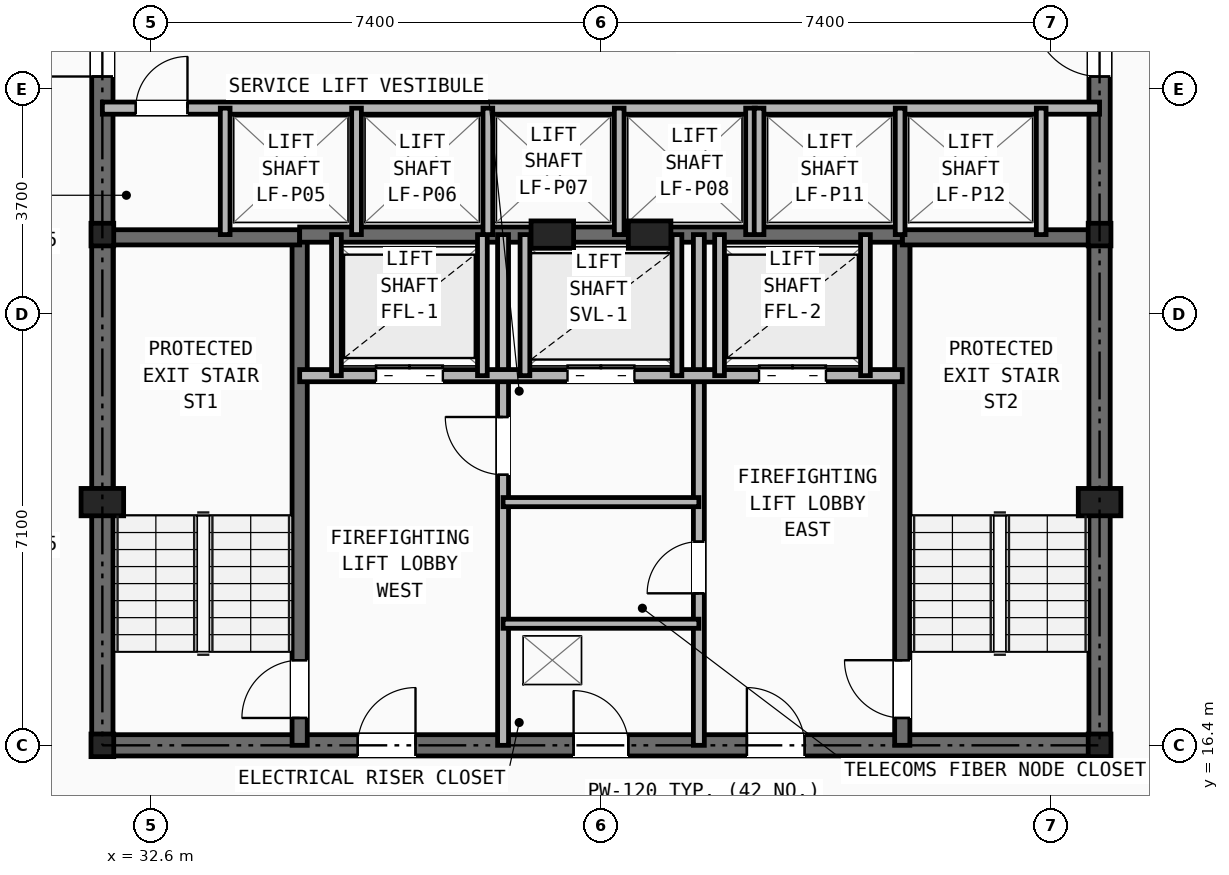
"""IFC4 building model, lengths in metres.
Left out: names, types, materials, properties, quantities, classifications, styles, units other than length and angle.
Written with IfcOpenShell. Run it as: python <this file> out.ifc"""

import sys

from ifc_helpers import new_model, si_unit, direction, frame, frame_2d, origin, origin_2d, place, context, subcontext, project, spatial, rectangle, i_section, extrude, element, fill, save


model = new_model("IFC4")
c1 = context("Model", 3, precision=1e-05, world=origin(), true_north=direction((0.0, 1.0)))
c2 = subcontext(c1, "Body", "Model", "MODEL_VIEW")
j1 = project(units=[si_unit("LENGTHUNIT", "METRE"), si_unit("PLANEANGLEUNIT", "RADIAN")], contexts=[c1])
p1 = place(None, origin())
s1 = spatial("IfcSite", under=j1, at=p1, CompositionType="ELEMENT")
p2 = place(p1, origin())
s2 = spatial("IfcBuilding", under=s1, at=p2, CompositionType="ELEMENT")
p3 = place(p2, frame((0.0, 0.0, 49.6)))
s3 = spatial("IfcBuildingStorey", under=s2, at=p3, CompositionType="ELEMENT", Elevation=49.6)
for number, where, z_axis, x_axis in (
    (1, (31.8, 16.4, 0.0), (0.0, 0.0, 1.0), (1.0, 0.0, 0.0)),
    (2, (48.2, 16.4, 0.0), (0.0, 0.0, 1.0), (1.0, 0.0, 0.0)),
    (3, (31.8, 24.8, 0.0), (0.0, 0.0, 1.0), (1.0, 0.0, 0.0)),
    (4, (48.2, 24.8, 0.0), (0.0, 0.0, 1.0), (1.0, 0.0, 0.0)),
):
    element("IfcColumn", number, at=place(p3, frame(where, z_axis=z_axis, x_axis=x_axis)), inside=s3, PredefinedType="COLUMN", context=c2, shape_type="SweptSolid", body=[
        extrude(i_section(OverallWidth=0.374, OverallDepth=0.372, WebThickness=0.016, FlangeThickness=0.026, at=origin_2d()), origin(), (0.0, 0.0, 1.0), 3.2),
    ])
for number, where, z_axis, x_axis in (
    (5, (31.8, 20.4, 0.0), (0.0, 0.0, 1.0), (1.0, 0.0, 0.0)),
    (6, (48.2, 20.4, 0.0), (0.0, 0.0, 1.0), (1.0, 0.0, 0.0)),
    (7, (39.2, 24.8, 0.0), (0.0, 0.0, 1.0), (1.0, 0.0, 0.0)),
    (8, (40.8, 24.8, 0.0), (0.0, 0.0, 1.0), (1.0, 0.0, 0.0)),
):
    element("IfcColumn", number, at=place(p3, frame(where, z_axis=z_axis, x_axis=x_axis)), inside=s3, PredefinedType="PILASTER", context=c2, shape_type="SweptSolid", body=[
        extrude(rectangle(XDim=0.7, YDim=0.45, at=origin_2d()), origin(), (0.0, 0.0, 1.0), 3.2),
    ])
p4 = place(p3, frame((31.8, 16.4, 0.0), z_axis=(0.0, 0.0, 1.0), x_axis=(1.0, 0.0, 0.0)))
e9 = element("IfcWall", 9, at=p4, inside=s3, PredefinedType="SHEAR", context=c2, shape_type="SweptSolid", body=[
    extrude(rectangle(XDim=16.4, YDim=0.35, at=frame_2d((8.2, 0.0))), origin(), (0.0, 0.0, 1.0), 2.98),
])
p5 = place(p4, frame((7.75, 0.0, 0.0)))
e10 = element("IfcOpeningElement", 10, at=p5, cuts=e9, PredefinedType="OPENING", context=c2, shape_type="SweptSolid", body=[
    extrude(rectangle(XDim=0.9, YDim=2.1, at=frame_2d((0.45, 1.05))), frame((0.0, 0.185, 0.0), z_axis=(0.0, -1.0, 0.0), x_axis=(1.0, 0.0, 0.0)), (0.0, 0.0, 1.0), 0.37),
])
p6 = place(p4, frame((4.2, 0.0, 0.0)))
e11 = element("IfcOpeningElement", 11, at=p6, cuts=e9, PredefinedType="OPENING", context=c2, shape_type="SweptSolid", body=[
    extrude(rectangle(XDim=0.95, YDim=2.1, at=frame_2d((0.475, 1.05))), frame((0.0, 0.185, 0.0), z_axis=(0.0, -1.0, 0.0), x_axis=(1.0, 0.0, 0.0)), (0.0, 0.0, 1.0), 0.37),
])
p7 = place(p4, frame((10.6, 0.0, 0.0)))
e12 = element("IfcOpeningElement", 12, at=p7, cuts=e9, PredefinedType="OPENING", context=c2, shape_type="SweptSolid", body=[
    extrude(rectangle(XDim=0.95, YDim=2.1, at=frame_2d((0.475, 1.05))), frame((0.0, 0.185, 0.0), z_axis=(0.0, -1.0, 0.0), x_axis=(1.0, 0.0, 0.0)), (0.0, 0.0, 1.0), 0.37),
])
p8 = place(p3, frame((31.8, 16.4, 0.0), z_axis=(0.0, 0.0, 1.0), x_axis=(0.0, 1.0, 0.0)))
e13 = element("IfcWall", 13, at=p8, inside=s3, PredefinedType="SHEAR", context=c2, shape_type="SweptSolid", body=[
    extrude(rectangle(XDim=14.8, YDim=0.35, at=frame_2d((7.4, 0.0))), origin(), (0.0, 0.0, 1.0), 2.98),
])
p9 = place(p8, frame((11.0, 0.0, 0.0)))
e14 = element("IfcOpeningElement", 14, at=p9, cuts=e13, PredefinedType="OPENING", context=c2, shape_type="SweptSolid", body=[
    extrude(rectangle(XDim=1.1, YDim=2.15, at=frame_2d((0.55, 1.075))), frame((0.0, 0.185, 0.0), z_axis=(0.0, -1.0, 0.0), x_axis=(1.0, 0.0, 0.0)), (0.0, 0.0, 1.0), 0.37),
])
p10 = place(p3, frame((48.2, 16.4, 0.0), z_axis=(0.0, 0.0, 1.0), x_axis=(0.0, 1.0, 0.0)))
e15 = element("IfcWall", 15, at=p10, inside=s3, PredefinedType="SHEAR", context=c2, shape_type="SweptSolid", body=[
    extrude(rectangle(XDim=14.8, YDim=0.35, at=frame_2d((7.4, 0.0))), origin(), (0.0, 0.0, 1.0), 2.98),
])
p11 = place(p10, frame((11.0, 0.0, 0.0)))
e16 = element("IfcOpeningElement", 16, at=p11, cuts=e15, PredefinedType="OPENING", context=c2, shape_type="SweptSolid", body=[
    extrude(rectangle(XDim=1.1, YDim=2.15, at=frame_2d((0.55, 1.075))), frame((0.0, 0.185, 0.0), z_axis=(0.0, -1.0, 0.0), x_axis=(1.0, 0.0, 0.0)), (0.0, 0.0, 1.0), 0.37),
])
p12 = place(p3, frame((35.045, 16.4, 0.0), z_axis=(0.0, 0.0, 1.0), x_axis=(0.0, 1.0, 0.0)))
e17 = element("IfcWall", 17, at=p12, inside=s3, PredefinedType="SHEAR", context=c2, shape_type="SweptSolid", body=[
    extrude(rectangle(XDim=8.4, YDim=0.25, at=frame_2d((4.2, 0.0))), origin(), (0.0, 0.0, 1.0), 2.98),
])
p13 = place(p12, frame((0.45, 0.0, 0.0)))
e18 = element("IfcOpeningElement", 18, at=p13, cuts=e17, PredefinedType="OPENING", context=c2, shape_type="SweptSolid", body=[
    extrude(rectangle(XDim=0.95, YDim=2.1, at=frame_2d((0.475, 1.05))), frame((0.0, 0.135, 0.0), z_axis=(0.0, -1.0, 0.0), x_axis=(1.0, 0.0, 0.0)), (0.0, 0.0, 1.0), 0.27),
])
p14 = place(p3, frame((31.8, 24.755, 0.0), z_axis=(0.0, 0.0, 1.0), x_axis=(1.0, 0.0, 0.0)))
e19 = element("IfcWall", 19, at=p14, inside=s3, PredefinedType="SHEAR", context=c2, shape_type="SweptSolid", body=[
    extrude(rectangle(XDim=3.245, YDim=0.25, at=frame_2d((1.623, 0.0))), origin(), (0.0, 0.0, 1.0), 2.98),
])
p15 = place(p3, frame((44.955, 16.4, 0.0), z_axis=(0.0, 0.0, 1.0), x_axis=(0.0, 1.0, 0.0)))
e20 = element("IfcWall", 20, at=p15, inside=s3, PredefinedType="SHEAR", context=c2, shape_type="SweptSolid", body=[
    extrude(rectangle(XDim=8.4, YDim=0.25, at=frame_2d((4.2, 0.0))), origin(), (0.0, 0.0, 1.0), 2.98),
])
p16 = place(p15, frame((0.45, 0.0, 0.0)))
e21 = element("IfcOpeningElement", 21, at=p16, cuts=e20, PredefinedType="OPENING", context=c2, shape_type="SweptSolid", body=[
    extrude(rectangle(XDim=0.95, YDim=2.1, at=frame_2d((0.475, 1.05))), frame((0.0, 0.135, 0.0), z_axis=(0.0, -1.0, 0.0), x_axis=(1.0, 0.0, 0.0)), (0.0, 0.0, 1.0), 0.27),
])
p17 = place(p3, frame((44.955, 24.755, 0.0), z_axis=(0.0, 0.0, 1.0), x_axis=(1.0, 0.0, 0.0)))
e22 = element("IfcWall", 22, at=p17, inside=s3, PredefinedType="SHEAR", context=c2, shape_type="SweptSolid", body=[
    extrude(rectangle(XDim=3.245, YDim=0.25, at=frame_2d((1.623, 0.0))), origin(), (0.0, 0.0, 1.0), 2.98),
])
p18 = place(p3, frame((35.045, 24.8, 0.0), z_axis=(0.0, 0.0, 1.0), x_axis=(1.0, 0.0, 0.0)))
e23 = element("IfcWall", 23, at=p18, inside=s3, PredefinedType="SHEAR", context=c2, shape_type="SweptSolid", body=[
    extrude(rectangle(XDim=9.91, YDim=0.25, at=frame_2d((4.955, 0.0))), origin(), (0.0, 0.0, 1.0), 2.98),
])
p19 = place(p3, frame((38.39, 16.4, 0.0), z_axis=(0.0, 0.0, 1.0), x_axis=(0.0, 1.0, 0.0)))
e24 = element("IfcWall", 24, at=p19, inside=s3, PredefinedType="PARTITIONING", context=c2, shape_type="SweptSolid", body=[
    extrude(rectangle(XDim=8.4, YDim=0.18, at=frame_2d((4.2, 0.0))), origin(), (0.0, 0.0, 1.0), 2.431),
])
p20 = place(p19, frame((4.45, 0.0, 0.0)))
e25 = element("IfcOpeningElement", 25, at=p20, cuts=e24, PredefinedType="OPENING", context=c2, shape_type="SweptSolid", body=[
    extrude(rectangle(XDim=0.95, YDim=2.1, at=frame_2d((0.475, 1.05))), frame((0.0, 0.1, 0.0), z_axis=(0.0, -1.0, 0.0), x_axis=(1.0, 0.0, 0.0)), (0.0, 0.0, 1.0), 0.2),
])
p21 = place(p3, frame((41.61, 16.4, 0.0), z_axis=(0.0, 0.0, 1.0), x_axis=(0.0, 1.0, 0.0)))
e26 = element("IfcWall", 26, at=p21, inside=s3, PredefinedType="PARTITIONING", context=c2, shape_type="SweptSolid", body=[
    extrude(rectangle(XDim=8.4, YDim=0.18, at=frame_2d((4.2, 0.0))), origin(), (0.0, 0.0, 1.0), 2.431),
])
p22 = place(p21, frame((2.5, 0.0, 0.0)))
e27 = element("IfcOpeningElement", 27, at=p22, cuts=e26, PredefinedType="OPENING", context=c2, shape_type="SweptSolid", body=[
    extrude(rectangle(XDim=0.85, YDim=2.05, at=frame_2d((0.425, 1.025))), frame((0.0, 0.1, 0.0), z_axis=(0.0, -1.0, 0.0), x_axis=(1.0, 0.0, 0.0)), (0.0, 0.0, 1.0), 0.2),
])
p23 = place(p3, frame((35.045, 22.48, 0.0), z_axis=(0.0, 0.0, 1.0), x_axis=(1.0, 0.0, 0.0)))
e28 = element("IfcWall", 28, at=p23, inside=s3, PredefinedType="SOLIDWALL", context=c2, shape_type="SweptSolid", body=[
    extrude(rectangle(XDim=9.91, YDim=0.2, at=frame_2d((4.955, 0.0))), origin(), (0.0, 0.0, 1.0), 2.98),
])
p24 = place(p23, frame((1.255, 0.0, 0.0)))
e29 = element("IfcOpeningElement", 29, at=p24, cuts=e28, PredefinedType="OPENING", context=c2, shape_type="SweptSolid", body=[
    extrude(rectangle(XDim=1.1, YDim=2.15, at=frame_2d((0.55, 1.075))), frame((0.0, 0.11, 0.0), z_axis=(0.0, -1.0, 0.0), x_axis=(1.0, 0.0, 0.0)), (0.0, 0.0, 1.0), 0.22),
])
p25 = place(p23, frame((7.555, 0.0, 0.0)))
e30 = element("IfcOpeningElement", 30, at=p25, cuts=e28, PredefinedType="OPENING", context=c2, shape_type="SweptSolid", body=[
    extrude(rectangle(XDim=1.1, YDim=2.15, at=frame_2d((0.55, 1.075))), frame((0.0, 0.11, 0.0), z_axis=(0.0, -1.0, 0.0), x_axis=(1.0, 0.0, 0.0)), (0.0, 0.0, 1.0), 0.22),
])
p26 = place(p23, frame((4.405, 0.0, 0.0)))
e31 = element("IfcOpeningElement", 31, at=p26, cuts=e28, PredefinedType="OPENING", context=c2, shape_type="SweptSolid", body=[
    extrude(rectangle(XDim=1.1, YDim=2.15, at=frame_2d((0.55, 1.075))), frame((0.0, 0.11, 0.0), z_axis=(0.0, -1.0, 0.0), x_axis=(1.0, 0.0, 0.0)), (0.0, 0.0, 1.0), 0.22),
])
for number, where, z_axis, x_axis in (
    (32, (38.39, 18.4, 0.0), (0.0, 0.0, 1.0), (1.0, 0.0, 0.0)),
    (33, (38.39, 20.4, 0.0), (0.0, 0.0, 1.0), (1.0, 0.0, 0.0)),
):
    element("IfcWall", number, at=place(p3, frame(where, z_axis=z_axis, x_axis=x_axis)), inside=s3, PredefinedType="PARTITIONING", context=c2, shape_type="SweptSolid", body=[
        extrude(rectangle(XDim=3.22, YDim=0.15, at=frame_2d((1.61, 0.0))), origin(), (0.0, 0.0, 1.0), 2.98),
    ])
for number, where, z_axis, x_axis in (
    (34, (35.65, 22.48, 0.0), (0.0, 0.0, 1.0), (0.0, 1.0, 0.0)),
    (35, (38.05, 22.48, 0.0), (0.0, 0.0, 1.0), (0.0, 1.0, 0.0)),
    (36, (41.95, 22.48, 0.0), (0.0, 0.0, 1.0), (0.0, 1.0, 0.0)),
    (37, (44.35, 22.48, 0.0), (0.0, 0.0, 1.0), (0.0, 1.0, 0.0)),
    (38, (38.75, 22.48, 0.0), (0.0, 0.0, 1.0), (0.0, 1.0, 0.0)),
    (39, (41.25, 22.48, 0.0), (0.0, 0.0, 1.0), (0.0, 1.0, 0.0)),
):
    element("IfcWall", number, at=place(p3, frame(where, z_axis=z_axis, x_axis=x_axis)), inside=s3, PredefinedType="SOLIDWALL", context=c2, shape_type="SweptSolid", body=[
        extrude(rectangle(XDim=2.32, YDim=0.16, at=frame_2d((1.16, 0.0))), origin(), (0.0, 0.0, 1.0), 2.98),
    ])
p27 = place(p3, frame((31.8, 26.88, 0.0), z_axis=(0.0, 0.0, 1.0), x_axis=(1.0, 0.0, 0.0)))
e40 = element("IfcWall", 40, at=p27, inside=s3, PredefinedType="SOLIDWALL", context=c2, shape_type="SweptSolid", body=[
    extrude(rectangle(XDim=16.4, YDim=0.2, at=frame_2d((8.2, 0.0))), origin(), (0.0, 0.0, 1.0), 2.431),
])
p28 = place(p27, frame((0.55, 0.0, 0.0)))
e41 = element("IfcOpeningElement", 41, at=p28, cuts=e40, PredefinedType="OPENING", context=c2, shape_type="SweptSolid", body=[
    extrude(rectangle(XDim=0.85, YDim=2.05, at=frame_2d((0.425, 1.025))), frame((0.0, 0.11, 0.0), z_axis=(0.0, -1.0, 0.0), x_axis=(1.0, 0.0, 0.0)), (0.0, 0.0, 1.0), 0.22),
])
for number, where, z_axis, x_axis in (
    (42, (33.82, 24.8, 0.0), (0.0, 0.0, 1.0), (0.0, 1.0, 0.0)),
    (43, (35.98, 24.8, 0.0), (0.0, 0.0, 1.0), (0.0, 1.0, 0.0)),
    (44, (38.14, 24.8, 0.0), (0.0, 0.0, 1.0), (0.0, 1.0, 0.0)),
    (45, (40.3, 24.8, 0.0), (0.0, 0.0, 1.0), (0.0, 1.0, 0.0)),
    (46, (42.46, 24.8, 0.0), (0.0, 0.0, 1.0), (0.0, 1.0, 0.0)),
    (47, (42.6, 24.8, 0.0), (0.0, 0.0, 1.0), (0.0, 1.0, 0.0)),
    (48, (44.92, 24.8, 0.0), (0.0, 0.0, 1.0), (0.0, 1.0, 0.0)),
    (49, (47.24, 24.8, 0.0), (0.0, 0.0, 1.0), (0.0, 1.0, 0.0)),
):
    element("IfcWall", number, at=place(p3, frame(where, z_axis=z_axis, x_axis=x_axis)), inside=s3, PredefinedType="SOLIDWALL", context=c2, shape_type="SweptSolid", body=[
        extrude(rectangle(XDim=2.08, YDim=0.16, at=frame_2d((1.04, 0.0))), origin(), (0.0, 0.0, 1.0), 2.98),
    ])
p29 = place(p5, origin())
e50 = element("IfcDoor", 50, at=p29, inside=s3, OperationType="SINGLE_SWING_LEFT", PredefinedType="DOOR", context=c2, shape_type="SweptSolid", body=[
    extrude(rectangle(XDim=0.9, YDim=2.1, at=frame_2d((0.45, 1.05))), frame((0.0, 0.025, 0.0), z_axis=(0.0, -1.0, 0.0), x_axis=(1.0, 0.0, 0.0)), (0.0, 0.0, 1.0), 0.05),
])
fill(e10, e50)
p30 = place(p22, origin())
e51 = element("IfcDoor", 51, at=p30, inside=s3, OperationType="SINGLE_SWING_LEFT", PredefinedType="DOOR", context=c2, shape_type="SweptSolid", body=[
    extrude(rectangle(XDim=0.85, YDim=2.05, at=frame_2d((0.425, 1.025))), frame((0.0, 0.025, 0.0), z_axis=(0.0, -1.0, 0.0), x_axis=(1.0, 0.0, 0.0)), (0.0, 0.0, 1.0), 0.05),
])
fill(e27, e51)
p31 = place(p20, origin())
e52 = element("IfcDoor", 52, at=p31, inside=s3, OperationType="SINGLE_SWING_RIGHT", PredefinedType="DOOR", context=c2, shape_type="SweptSolid", body=[
    extrude(rectangle(XDim=0.95, YDim=2.1, at=frame_2d((0.475, 1.05))), frame((0.0, 0.025, 0.0), z_axis=(0.0, -1.0, 0.0), x_axis=(1.0, 0.0, 0.0)), (0.0, 0.0, 1.0), 0.05),
])
fill(e25, e52)
p32 = place(p13, origin())
e53 = element("IfcDoor", 53, at=p32, inside=s3, OperationType="SINGLE_SWING_LEFT", PredefinedType="DOOR", context=c2, shape_type="SweptSolid", body=[
    extrude(rectangle(XDim=0.95, YDim=2.1, at=frame_2d((0.475, 1.05))), frame((0.0, 0.025, 0.0), z_axis=(0.0, -1.0, 0.0), x_axis=(1.0, 0.0, 0.0)), (0.0, 0.0, 1.0), 0.05),
])
fill(e18, e53)
p33 = place(p16, origin())
e54 = element("IfcDoor", 54, at=p33, inside=s3, OperationType="SINGLE_SWING_RIGHT", PredefinedType="DOOR", context=c2, shape_type="SweptSolid", body=[
    extrude(rectangle(XDim=0.95, YDim=2.1, at=frame_2d((0.475, 1.05))), frame((0.0, 0.025, 0.0), z_axis=(0.0, -1.0, 0.0), x_axis=(1.0, 0.0, 0.0)), (0.0, 0.0, 1.0), 0.05),
])
fill(e21, e54)
p34 = place(p6, origin())
e55 = element("IfcDoor", 55, at=p34, inside=s3, OperationType="SINGLE_SWING_RIGHT", PredefinedType="DOOR", context=c2, shape_type="SweptSolid", body=[
    extrude(rectangle(XDim=0.95, YDim=2.1, at=frame_2d((0.475, 1.05))), frame((0.0, 0.025, 0.0), z_axis=(0.0, -1.0, 0.0), x_axis=(1.0, 0.0, 0.0)), (0.0, 0.0, 1.0), 0.05),
])
fill(e11, e55)
p35 = place(p7, origin())
e56 = element("IfcDoor", 56, at=p35, inside=s3, OperationType="SINGLE_SWING_LEFT", PredefinedType="DOOR", context=c2, shape_type="SweptSolid", body=[
    extrude(rectangle(XDim=0.95, YDim=2.1, at=frame_2d((0.475, 1.05))), frame((0.0, 0.025, 0.0), z_axis=(0.0, -1.0, 0.0), x_axis=(1.0, 0.0, 0.0)), (0.0, 0.0, 1.0), 0.05),
])
fill(e12, e56)
p36 = place(p24, origin())
e57 = element("IfcDoor", 57, at=p36, inside=s3, OperationType="DOUBLE_DOOR_SLIDING", PredefinedType="DOOR", context=c2, shape_type="SweptSolid", body=[
    extrude(rectangle(XDim=1.1, YDim=2.15, at=frame_2d((0.55, 1.075))), frame((0.0, 0.025, 0.0), z_axis=(0.0, -1.0, 0.0), x_axis=(1.0, 0.0, 0.0)), (0.0, 0.0, 1.0), 0.05),
])
fill(e29, e57)
p37 = place(p25, origin())
e58 = element("IfcDoor", 58, at=p37, inside=s3, OperationType="DOUBLE_DOOR_SLIDING", PredefinedType="DOOR", context=c2, shape_type="SweptSolid", body=[
    extrude(rectangle(XDim=1.1, YDim=2.15, at=frame_2d((0.55, 1.075))), frame((0.0, 0.025, 0.0), z_axis=(0.0, -1.0, 0.0), x_axis=(1.0, 0.0, 0.0)), (0.0, 0.0, 1.0), 0.05),
])
fill(e30, e58)
p38 = place(p26, origin())
e59 = element("IfcDoor", 59, at=p38, inside=s3, OperationType="DOUBLE_DOOR_SLIDING", PredefinedType="DOOR", context=c2, shape_type="SweptSolid", body=[
    extrude(rectangle(XDim=1.1, YDim=2.15, at=frame_2d((0.55, 1.075))), frame((0.0, 0.025, 0.0), z_axis=(0.0, -1.0, 0.0), x_axis=(1.0, 0.0, 0.0)), (0.0, 0.0, 1.0), 0.05),
])
fill(e31, e59)
p39 = place(p28, origin())
e60 = element("IfcDoor", 60, at=p39, inside=s3, OperationType="SINGLE_SWING_RIGHT", PredefinedType="DOOR", context=c2, shape_type="SweptSolid", body=[
    extrude(rectangle(XDim=0.85, YDim=2.05, at=frame_2d((0.425, 1.025))), frame((0.0, 0.025, 0.0), z_axis=(0.0, -1.0, 0.0), x_axis=(1.0, 0.0, 0.0)), (0.0, 0.0, 1.0), 0.05),
])
fill(e41, e60)
p40 = place(p9, origin())
e61 = element("IfcDoor", 61, at=p40, inside=s3, OperationType="SINGLE_SWING_LEFT", PredefinedType="DOOR", context=c2, shape_type="SweptSolid", body=[
    extrude(rectangle(XDim=1.1, YDim=2.15, at=frame_2d((0.55, 1.075))), frame((0.0, 0.025, 0.0), z_axis=(0.0, -1.0, 0.0), x_axis=(1.0, 0.0, 0.0)), (0.0, 0.0, 1.0), 0.05),
])
fill(e14, e61)
p41 = place(p11, origin())
e62 = element("IfcDoor", 62, at=p41, inside=s3, OperationType="SINGLE_SWING_RIGHT", PredefinedType="DOOR", context=c2, shape_type="SweptSolid", body=[
    extrude(rectangle(XDim=1.1, YDim=2.15, at=frame_2d((0.55, 1.075))), frame((0.0, 0.025, 0.0), z_axis=(0.0, -1.0, 0.0), x_axis=(1.0, 0.0, 0.0)), (0.0, 0.0, 1.0), 0.05),
])
fill(e16, e62)
save(model, sys.argv[1])
